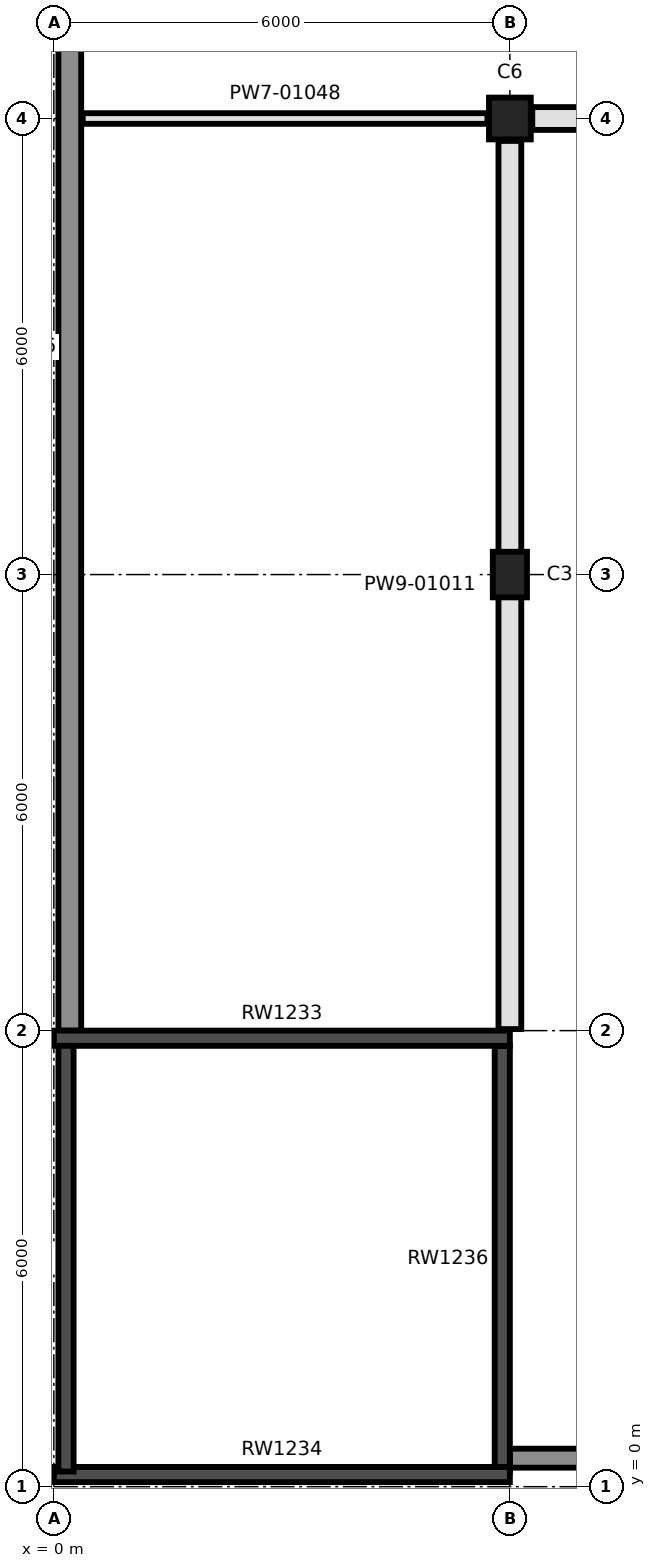
"""IFC4 building model, lengths in metres.
Left out: names, types, materials, properties, quantities, classifications, styles, units other than length and angle.
Written with IfcOpenShell. Run it as: python <this file> out.ifc"""

import sys

from ifc_helpers import new_model, si_unit, direction, frame, frame_2d, origin, origin_2d, place, context, subcontext, project, spatial, rectangle, extrude, element, fill, save


model = new_model("IFC4")
c1 = context("Model", 3, precision=1e-05, world=origin(), true_north=direction((0.0, 1.0)))
c2 = subcontext(c1, "Body", "Model", "MODEL_VIEW")
j1 = project(units=[si_unit("LENGTHUNIT", "METRE"), si_unit("PLANEANGLEUNIT", "RADIAN")], contexts=[c1])
p1 = place(None, origin())
s1 = spatial("IfcSite", under=j1, at=p1, CompositionType="ELEMENT")
p2 = place(p1, origin())
s2 = spatial("IfcBuilding", under=s1, at=p2, CompositionType="ELEMENT")
p3 = place(p2, frame((0.0, 0.0, 7.0)))
s3 = spatial("IfcBuildingStorey", under=s2, at=p3, CompositionType="ELEMENT", Elevation=7.0)
p4 = place(p3, frame((6.0, 12.0, 0.0), z_axis=(0.0, 0.0, 1.0), x_axis=(1.0, 0.0, 0.0)))
e1 = element("IfcColumn", 1, at=p4, inside=s3, PredefinedType="COLUMN", context=c2, shape_type="SweptSolid", body=[
    extrude(rectangle(XDim=0.45, YDim=0.6, at=origin_2d()), origin(), (0.0, 0.0, 1.0), 5.0),
])
p5 = place(p3, frame((6.0, 18.0, 0.0), z_axis=(0.0, 0.0, 1.0), x_axis=(1.0, 0.0, 0.0)))
e2 = element("IfcColumn", 2, at=p5, inside=s3, PredefinedType="COLUMN", context=c2, shape_type="SweptSolid", body=[
    extrude(rectangle(XDim=0.55, YDim=0.55, at=origin_2d()), origin(), (0.0, 0.0, 1.0), 5.0),
])
p6 = place(p3, frame((0.0, 5.9, 0.0), z_axis=(0.0, 0.0, 1.0), x_axis=(1.0, 0.0, 0.0)))
e3 = element("IfcWall", 3, at=p6, inside=s3, PredefinedType="SHEAR", context=c2, shape_type="SweptSolid", body=[
    extrude(rectangle(XDim=6.0, YDim=0.2, at=frame_2d((3.0, 0.0))), origin(), (0.0, 0.0, 1.0), 5.0),
])
p7 = place(p6, frame((4.6, 0.0, 0.0)))
e4 = element("IfcOpeningElement", 4, at=p7, cuts=e3, PredefinedType="OPENING", context=c2, shape_type="SweptSolid", body=[
    extrude(rectangle(XDim=1.1, YDim=2.2, at=frame_2d((0.55, 1.1))), frame((0.0, 0.11, 0.0), z_axis=(0.0, -1.0, 0.0), x_axis=(1.0, 0.0, 0.0)), (0.0, 0.0, 1.0), 0.22),
])
p8 = place(p3, frame((0.0, 0.16, 0.0), z_axis=(0.0, 0.0, 1.0), x_axis=(1.0, 0.0, 0.0)))
e5 = element("IfcWall", 5, at=p8, inside=s3, PredefinedType="SHEAR", context=c2, shape_type="SweptSolid", body=[
    extrude(rectangle(XDim=6.0, YDim=0.2, at=frame_2d((3.0, 0.0))), origin(), (0.0, 0.0, 1.0), 5.0),
])
p9 = place(p8, frame((2.75, 0.0, 0.9)))
e6 = element("IfcOpeningElement", 6, at=p9, cuts=e5, PredefinedType="OPENING", context=c2, shape_type="SweptSolid", body=[
    extrude(rectangle(XDim=0.5, YDim=2.1, at=frame_2d((0.25, 1.05))), frame((0.0, 0.11, 0.0), z_axis=(0.0, -1.0, 0.0), x_axis=(1.0, 0.0, 0.0)), (0.0, 0.0, 1.0), 0.22),
])
p10 = place(p3, frame((0.16, 0.2, 0.0), z_axis=(0.0, 0.0, 1.0), x_axis=(0.0, 1.0, 0.0)))
e7 = element("IfcWall", 7, at=p10, inside=s3, PredefinedType="SHEAR", context=c2, shape_type="SweptSolid", body=[
    extrude(rectangle(XDim=5.6, YDim=0.2, at=frame_2d((2.8, 0.0))), origin(), (0.0, 0.0, 1.0), 5.0),
])
p11 = place(p10, frame((2.55, 0.0, 0.9)))
e8 = element("IfcOpeningElement", 8, at=p11, cuts=e7, PredefinedType="OPENING", context=c2, shape_type="SweptSolid", body=[
    extrude(rectangle(XDim=0.5, YDim=2.1, at=frame_2d((0.25, 1.05))), frame((0.0, 0.11, 0.0), z_axis=(0.0, -1.0, 0.0), x_axis=(1.0, 0.0, 0.0)), (0.0, 0.0, 1.0), 0.22),
])
p12 = place(p3, frame((5.9, 0.2, 0.0), z_axis=(0.0, 0.0, 1.0), x_axis=(0.0, 1.0, 0.0)))
e9 = element("IfcWall", 9, at=p12, inside=s3, PredefinedType="SHEAR", context=c2, shape_type="SweptSolid", body=[
    extrude(rectangle(XDim=5.6, YDim=0.2, at=frame_2d((2.8, 0.0))), origin(), (0.0, 0.0, 1.0), 5.0),
])
p13 = place(p3, frame((0.21, 6.0, 0.0), z_axis=(0.0, 0.0, 1.0), x_axis=(0.0, 1.0, 0.0)))
e10 = element("IfcWall", 10, at=p13, inside=s3, PredefinedType="SOLIDWALL", context=c2, shape_type="SweptSolid", body=[
    extrude(rectangle(XDim=18.0, YDim=0.3, at=frame_2d((9.0, 0.0))), origin(), (0.0, 0.0, 1.0), 5.0),
])
p14 = place(p3, frame((11.8, 0.375, 0.0), z_axis=(0.0, 0.0, 1.0), x_axis=(-1.0, 0.0, 0.0)))
e11 = element("IfcWall", 11, at=p14, inside=s3, PredefinedType="SOLIDWALL", context=c2, shape_type="SweptSolid", body=[
    extrude(rectangle(XDim=5.8, YDim=0.25, at=frame_2d((2.9, 0.0))), origin(), (0.0, 0.0, 1.0), 8.9),
])
p15 = place(p3, frame((6.295, 18.0, 0.0), z_axis=(0.0, 0.0, 1.0), x_axis=(1.0, 0.0, 0.0)))
e12 = element("IfcWall", 12, at=p15, inside=s3, PredefinedType="PARTITIONING", context=c2, shape_type="SweptSolid", body=[
    extrude(rectangle(XDim=5.385, YDim=0.3, at=frame_2d((2.692, 0.0))), origin(), (0.0, 0.0, 1.0), 4.1),
])
p16 = place(p15, frame((1.755, 0.0, 0.0)))
e13 = element("IfcOpeningElement", 13, at=p16, cuts=e12, PredefinedType="OPENING", context=c2, shape_type="SweptSolid", body=[
    extrude(rectangle(XDim=1.8, YDim=2.1, at=frame_2d((0.9, 1.05))), frame((0.0, 0.16, 0.0), z_axis=(0.0, -1.0, 0.0), x_axis=(1.0, 0.0, 0.0)), (0.0, 0.0, 1.0), 0.32),
])
p17 = place(p3, frame((6.0, 6.02, 0.0), z_axis=(0.0, 0.0, 1.0), x_axis=(0.0, 1.0, 0.0)))
e14 = element("IfcWall", 14, at=p17, inside=s3, PredefinedType="PARTITIONING", context=c2, shape_type="SweptSolid", body=[
    extrude(rectangle(XDim=11.685, YDim=0.3, at=frame_2d((5.843, 0.0))), origin(), (0.0, 0.0, 1.0), 4.1),
])
p18 = place(p17, frame((2.03, 0.0, 0.0)))
e15 = element("IfcOpeningElement", 15, at=p18, cuts=e14, PredefinedType="OPENING", context=c2, shape_type="SweptSolid", body=[
    extrude(rectangle(XDim=1.8, YDim=2.1, at=frame_2d((0.9, 1.05))), frame((0.0, 0.16, 0.0), z_axis=(0.0, -1.0, 0.0), x_axis=(1.0, 0.0, 0.0)), (0.0, 0.0, 1.0), 0.32),
])
p19 = place(p17, frame((8.03, 0.0, 0.0)))
e16 = element("IfcOpeningElement", 16, at=p19, cuts=e14, PredefinedType="OPENING", context=c2, shape_type="SweptSolid", body=[
    extrude(rectangle(XDim=1.8, YDim=2.1, at=frame_2d((0.9, 1.05))), frame((0.0, 0.16, 0.0), z_axis=(0.0, -1.0, 0.0), x_axis=(1.0, 0.0, 0.0)), (0.0, 0.0, 1.0), 0.32),
])
p20 = place(p3, frame((0.38, 18.0, 0.0), z_axis=(0.0, 0.0, 1.0), x_axis=(1.0, 0.0, 0.0)))
e17 = element("IfcWall", 17, at=p20, inside=s3, PredefinedType="PARTITIONING", context=c2, shape_type="SweptSolid", body=[
    extrude(rectangle(XDim=5.325, YDim=0.14, at=frame_2d((2.663, 0.0))), origin(), (0.0, 0.0, 1.0), 4.05),
])
p21 = place(p20, frame((1.67, 0.0, 0.0)))
e18 = element("IfcOpeningElement", 18, at=p21, cuts=e17, PredefinedType="OPENING", context=c2, shape_type="SweptSolid", body=[
    extrude(rectangle(XDim=1.8, YDim=2.1, at=frame_2d((0.9, 1.05))), frame((0.0, 0.08, 0.0), z_axis=(0.0, -1.0, 0.0), x_axis=(1.0, 0.0, 0.0)), (0.0, 0.0, 1.0), 0.16),
])
p22 = place(p9, origin())
e19 = element("IfcWindow", 19, at=p22, inside=s3, PartitioningType="SINGLE_PANEL", PredefinedType="WINDOW", context=c2, shape_type="SweptSolid", body=[
    extrude(rectangle(XDim=0.5, YDim=2.1, at=frame_2d((0.25, 1.05))), frame((0.0, 0.03, 0.0), z_axis=(0.0, -1.0, 0.0), x_axis=(1.0, 0.0, 0.0)), (0.0, 0.0, 1.0), 0.06),
])
fill(e6, e19)
p23 = place(p11, origin())
e20 = element("IfcWindow", 20, at=p23, inside=s3, PartitioningType="SINGLE_PANEL", PredefinedType="WINDOW", context=c2, shape_type="SweptSolid", body=[
    extrude(rectangle(XDim=0.5, YDim=2.1, at=frame_2d((0.25, 1.05))), frame((0.0, 0.03, 0.0), z_axis=(0.0, -1.0, 0.0), x_axis=(1.0, 0.0, 0.0)), (0.0, 0.0, 1.0), 0.06),
])
fill(e8, e20)
p24 = place(p18, origin())
e21 = element("IfcDoor", 21, at=p24, inside=s3, OperationType="DOUBLE_DOOR_SINGLE_SWING", PredefinedType="DOOR", context=c2, shape_type="SweptSolid", body=[
    extrude(rectangle(XDim=1.8, YDim=2.1, at=frame_2d((0.9, 1.05))), frame((0.0, 0.025, 0.0), z_axis=(0.0, -1.0, 0.0), x_axis=(1.0, 0.0, 0.0)), (0.0, 0.0, 1.0), 0.05),
])
fill(e15, e21)
p25 = place(p19, origin())
e22 = element("IfcDoor", 22, at=p25, inside=s3, OperationType="DOUBLE_DOOR_SINGLE_SWING", PredefinedType="DOOR", context=c2, shape_type="SweptSolid", body=[
    extrude(rectangle(XDim=1.8, YDim=2.1, at=frame_2d((0.9, 1.05))), frame((0.0, 0.025, 0.0), z_axis=(0.0, -1.0, 0.0), x_axis=(1.0, 0.0, 0.0)), (0.0, 0.0, 1.0), 0.05),
])
fill(e16, e22)
p26 = place(p7, frame((1.1, 0.0, 0.0), z_axis=(0.0, 0.0, 1.0), x_axis=(-1.0, 0.0, 0.0)))
e23 = element("IfcDoor", 23, at=p26, inside=s3, OperationType="SINGLE_SWING_RIGHT", PredefinedType="DOOR", context=c2, shape_type="SweptSolid", body=[
    extrude(rectangle(XDim=1.1, YDim=2.2, at=frame_2d((0.55, 1.1))), frame((0.0, 0.025, 0.0), z_axis=(0.0, -1.0, 0.0), x_axis=(1.0, 0.0, 0.0)), (0.0, 0.0, 1.0), 0.05),
])
fill(e4, e23)
p27 = place(p21, frame((1.8, 0.0, 0.0), z_axis=(0.0, 0.0, 1.0), x_axis=(-1.0, 0.0, 0.0)))
e24 = element("IfcDoor", 24, at=p27, inside=s3, OperationType="DOUBLE_DOOR_SINGLE_SWING", PredefinedType="DOOR", context=c2, shape_type="SweptSolid", body=[
    extrude(rectangle(XDim=1.8, YDim=2.1, at=frame_2d((0.9, 1.05))), frame((0.0, 0.025, 0.0), z_axis=(0.0, -1.0, 0.0), x_axis=(1.0, 0.0, 0.0)), (0.0, 0.0, 1.0), 0.05),
])
fill(e18, e24)
save(model, sys.argv[1])
